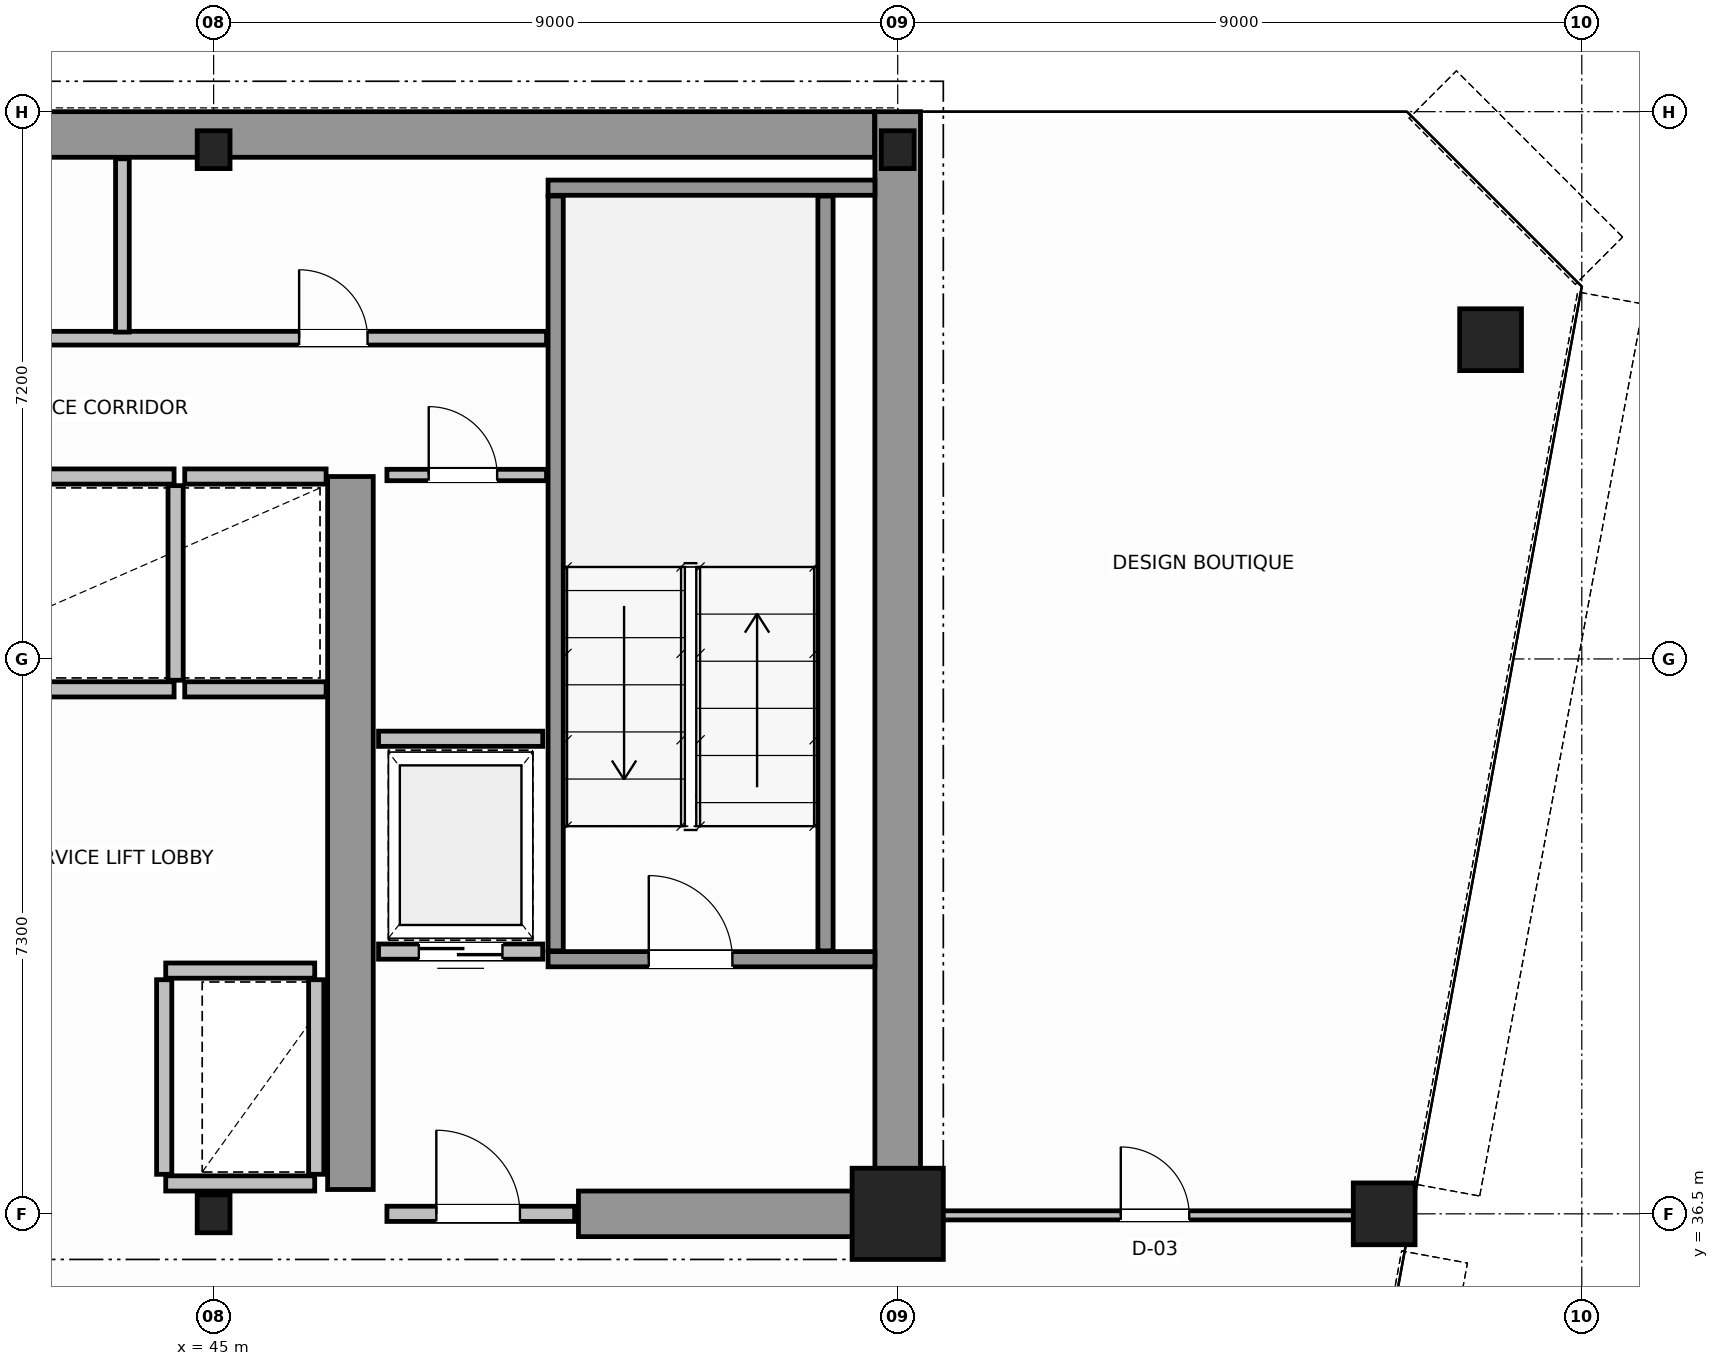
"""IFC4 building model, lengths in metres.
Left out: names, types, materials, properties, quantities, classifications, styles, units other than length and angle.
Written with IfcOpenShell. Run it as: python <this file> out.ifc"""

import sys

from ifc_helpers import new_model, si_unit, direction, frame, frame_2d, origin, origin_2d, place, context, subcontext, project, spatial, rectangle, hollow_circle, i_section, extrude, source, transform, mapped, element, fill, save


model = new_model("IFC4")
c1 = context("Model", 3, precision=1e-05, world=origin(), true_north=direction((0.0, 1.0)))
c2 = subcontext(c1, "Body", "Model", "MODEL_VIEW")
j1 = project(units=[si_unit("LENGTHUNIT", "METRE"), si_unit("PLANEANGLEUNIT", "RADIAN")], contexts=[c1])
p1 = place(None, origin())
s1 = spatial("IfcSite", under=j1, at=p1, CompositionType="ELEMENT")
p2 = place(p1, origin())
s2 = spatial("IfcBuilding", under=s1, at=p2, CompositionType="ELEMENT")
p3 = place(p2, frame((0.0, 0.0, 188.0)))
s3 = spatial("IfcBuildingStorey", under=s2, at=p3, CompositionType="ELEMENT", Elevation=188.0)
m1 = source(origin(), c2, "Body", "SweptSolid", [
    extrude(i_section(OverallWidth=0.432, OverallDepth=0.498, WebThickness=0.055, FlangeThickness=0.068, FilletRadius=0.015, at=origin_2d()), origin(), (0.0, 0.0, 1.0), 3.8),
])
p4 = place(p3, frame((45.0, 36.5, 0.0), z_axis=(0.0, 0.0, 1.0), x_axis=(1.0, 0.0, 0.0)))
e1 = element("IfcColumn", 1, at=p4, inside=s3, PredefinedType="COLUMN", context=c2, shape_type="MappedRepresentation", body=[
    mapped(m1, transform((0.0, 0.0, 0.0), scale=1.0)),
])
m2 = source(origin(), c2, "Body", "SweptSolid", [
    extrude(rectangle(XDim=1.2, YDim=1.2, at=origin_2d()), origin(), (0.0, 0.0, 1.0), 3.8),
])
p5 = place(p3, frame((54.0, 36.5, 0.0), z_axis=(0.0, 0.0, 1.0), x_axis=(1.0, 0.0, 0.0)))
e2 = element("IfcColumn", 2, at=p5, inside=s3, PredefinedType="COLUMN", context=c2, shape_type="MappedRepresentation", body=[
    mapped(m2, transform((0.0, 0.0, 0.0), scale=1.0)),
])
for number, where, z_axis, x_axis in (
    (3, (45.0, 50.5, 0.0), (0.0, 0.0, 1.0), (1.0, 0.0, 0.0)),
    (4, (54.0, 50.5, 0.0), (0.0, 0.0, 1.0), (1.0, 0.0, 0.0)),
):
    element("IfcColumn", number, at=place(p3, frame(where, z_axis=z_axis, x_axis=x_axis)), inside=s3, PredefinedType="COLUMN", context=c2, shape_type="MappedRepresentation", body=[
        mapped(m1, transform((0.0, 0.0, 0.0), scale=1.0)),
    ])
m3 = source(origin(), c2, "Body", "SweptSolid", [
    extrude(hollow_circle(Radius=0.406, WallThickness=0.04, at=origin_2d()), origin(), (0.0, 0.0, 1.0), 3.8),
])
for number, where, z_axis, x_axis in (
    (5, (61.8, 48.0, 0.0), (0.0, 0.0, 1.0), (1.0, 0.0, 0.0)),
    (6, (60.4, 36.5, 0.0), (0.0, 0.0, 1.0), (1.0, 0.0, 0.0)),
):
    element("IfcColumn", number, at=place(p3, frame(where, z_axis=z_axis, x_axis=x_axis)), inside=s3, PredefinedType="COLUMN", context=c2, shape_type="MappedRepresentation", body=[
        mapped(m3, transform((0.0, 0.0, 0.0), scale=1.0)),
    ])
p6 = place(p3, frame((34.002, 50.7, 0.0), z_axis=(0.0, 0.0, 1.0), x_axis=(1.0, 0.0, 0.0)))
e7 = element("IfcWall", 7, at=p6, inside=s3, PredefinedType="SHEAR", context=c2, shape_type="SweptSolid", body=[
    extrude(rectangle(XDim=19.694, YDim=0.6, at=frame_2d((9.847, 0.0))), origin(), (0.0, 0.0, 1.0), 3.8),
])
p7 = place(p3, frame((54.0, 36.5, 0.0), z_axis=(0.0, 0.0, 1.0), x_axis=(0.0, 1.0, 0.0)))
e8 = element("IfcWall", 8, at=p7, inside=s3, PredefinedType="SHEAR", context=c2, shape_type="SweptSolid", body=[
    extrude(rectangle(XDim=14.5, YDim=0.6, at=frame_2d((7.25, 0.0))), origin(), (0.0, 0.0, 1.0), 3.8),
])
p8 = place(p3, frame((49.8, 36.5, 0.0), z_axis=(0.0, 0.0, 1.0), x_axis=(1.0, 0.0, 0.0)))
e9 = element("IfcWall", 9, at=p8, inside=s3, PredefinedType="SHEAR", context=c2, shape_type="SweptSolid", body=[
    extrude(rectangle(XDim=3.88, YDim=0.6, at=frame_2d((1.94, 0.0))), origin(), (0.0, 0.0, 1.0), 2.58),
])
p9 = place(p3, frame((46.8, 36.82, 0.0), z_axis=(0.0, 0.0, 1.0), x_axis=(0.0, 1.0, 0.0)))
e10 = element("IfcWall", 10, at=p9, inside=s3, PredefinedType="SHEAR", context=c2, shape_type="SweptSolid", body=[
    extrude(rectangle(XDim=9.38, YDim=0.6, at=frame_2d((4.69, 0.0))), origin(), (0.0, 0.0, 1.0), 3.8),
])
p10 = place(p3, frame((49.4, 39.85, 0.0), z_axis=(0.0, 0.0, 1.0), x_axis=(1.0, 0.0, 0.0)))
e11 = element("IfcWall", 11, at=p10, inside=s3, PredefinedType="SOLIDWALL", context=c2, shape_type="SweptSolid", body=[
    extrude(rectangle(XDim=4.3, YDim=0.2, at=frame_2d((2.15, 0.0))), origin(), (0.0, 0.0, 1.0), 3.8),
])
p11 = place(p10, frame((1.325, 0.0, 0.0)))
e12 = element("IfcOpeningElement", 12, at=p11, cuts=e11, PredefinedType="OPENING", context=c2, shape_type="SweptSolid", body=[
    extrude(rectangle(XDim=1.1, YDim=2.15, at=frame_2d((0.55, 1.075))), frame((0.0, 0.11, 0.0), z_axis=(0.0, -1.0, 0.0), x_axis=(1.0, 0.0, 0.0)), (0.0, 0.0, 1.0), 0.22),
])
p12 = place(p3, frame((49.4, 50.0, 0.0), z_axis=(0.0, 0.0, 1.0), x_axis=(1.0, 0.0, 0.0)))
e13 = element("IfcWall", 13, at=p12, inside=s3, PredefinedType="SOLIDWALL", context=c2, shape_type="SweptSolid", body=[
    extrude(rectangle(XDim=4.3, YDim=0.2, at=frame_2d((2.15, 0.0))), origin(), (0.0, 0.0, 1.0), 3.8),
])
for number, where, z_axis, x_axis in (
    (14, (49.5, 39.96, 0.0), (0.0, 0.0, 1.0), (0.0, 1.0, 0.0)),
    (15, (53.05, 39.96, 0.0), (0.0, 0.0, 1.0), (0.0, 1.0, 0.0)),
):
    element("IfcWall", number, at=place(p3, frame(where, z_axis=z_axis, x_axis=x_axis)), inside=s3, PredefinedType="SOLIDWALL", context=c2, shape_type="SweptSolid", body=[
        extrude(rectangle(XDim=9.93, YDim=0.2, at=frame_2d((4.965, 0.0))), origin(), (0.0, 0.0, 1.0), 3.8),
    ])
p13 = place(p3, frame((47.28, 36.5, 0.0), z_axis=(0.0, 0.0, 1.0), x_axis=(1.0, 0.0, 0.0)))
e16 = element("IfcWall", 16, at=p13, inside=s3, PredefinedType="SOLIDWALL", context=c2, shape_type="SweptSolid", body=[
    extrude(rectangle(XDim=2.47, YDim=0.2, at=frame_2d((1.235, 0.0))), origin(), (0.0, 0.0, 1.0), 2.57),
])
p14 = place(p13, frame((0.65, 0.0, 0.0)))
e17 = element("IfcOpeningElement", 17, at=p14, cuts=e16, PredefinedType="OPENING", context=c2, shape_type="SweptSolid", body=[
    extrude(rectangle(XDim=1.1, YDim=2.15, at=frame_2d((0.55, 1.075))), frame((0.0, 0.11, 0.0), z_axis=(0.0, -1.0, 0.0), x_axis=(1.0, 0.0, 0.0)), (0.0, 0.0, 1.0), 0.22),
])
p15 = place(p3, frame((44.37, 39.7, 0.0), z_axis=(0.0, 0.0, 1.0), x_axis=(1.0, 0.0, 0.0)))
e18 = element("IfcWall", 18, at=p15, inside=s3, PredefinedType="SOLIDWALL", context=c2, shape_type="SweptSolid", body=[
    extrude(rectangle(XDim=1.96, YDim=0.2, at=frame_2d((0.98, 0.0))), origin(), (0.0, 0.0, 1.0), 3.58),
])
p16 = place(p3, frame((44.37, 36.9, 0.0), z_axis=(0.0, 0.0, 1.0), x_axis=(1.0, 0.0, 0.0)))
e19 = element("IfcWall", 19, at=p16, inside=s3, PredefinedType="SOLIDWALL", context=c2, shape_type="SweptSolid", body=[
    extrude(rectangle(XDim=1.96, YDim=0.2, at=frame_2d((0.98, 0.0))), origin(), (0.0, 0.0, 1.0), 2.57),
])
for number, where, z_axis, x_axis in (
    (20, (44.35, 37.02, 0.0), (0.0, 0.0, 1.0), (0.0, 1.0, 0.0)),
    (21, (46.35, 37.02, 0.0), (0.0, 0.0, 1.0), (0.0, 1.0, 0.0)),
):
    element("IfcWall", number, at=place(p3, frame(where, z_axis=z_axis, x_axis=x_axis)), inside=s3, PredefinedType="SOLIDWALL", context=c2, shape_type="SweptSolid", body=[
        extrude(rectangle(XDim=2.56, YDim=0.2, at=frame_2d((1.28, 0.0))), origin(), (0.0, 0.0, 1.0), 3.58),
    ])
for number, where, z_axis, x_axis in (
    (22, (42.62, 43.4, 0.0), (0.0, 0.0, 1.0), (1.0, 0.0, 0.0)),
    (23, (42.62, 46.2, 0.0), (0.0, 0.0, 1.0), (1.0, 0.0, 0.0)),
):
    element("IfcWall", number, at=place(p3, frame(where, z_axis=z_axis, x_axis=x_axis)), inside=s3, PredefinedType="SOLIDWALL", context=c2, shape_type="SweptSolid", body=[
        extrude(rectangle(XDim=1.86, YDim=0.2, at=frame_2d((0.93, 0.0))), origin(), (0.0, 0.0, 1.0), 3.58),
    ])
p17 = place(p3, frame((44.5, 43.52, 0.0), z_axis=(0.0, 0.0, 1.0), x_axis=(0.0, 1.0, 0.0)))
e24 = element("IfcWall", 24, at=p17, inside=s3, PredefinedType="SOLIDWALL", context=c2, shape_type="SweptSolid", body=[
    extrude(rectangle(XDim=2.56, YDim=0.2, at=frame_2d((1.28, 0.0))), origin(), (0.0, 0.0, 1.0), 3.58),
])
for number, where, z_axis, x_axis in (
    (25, (44.62, 43.4, 0.0), (0.0, 0.0, 1.0), (1.0, 0.0, 0.0)),
    (26, (44.62, 46.2, 0.0), (0.0, 0.0, 1.0), (1.0, 0.0, 0.0)),
):
    element("IfcWall", number, at=place(p3, frame(where, z_axis=z_axis, x_axis=x_axis)), inside=s3, PredefinedType="SOLIDWALL", context=c2, shape_type="SweptSolid", body=[
        extrude(rectangle(XDim=1.86, YDim=0.2, at=frame_2d((0.93, 0.0))), origin(), (0.0, 0.0, 1.0), 3.58),
    ])
p18 = place(p3, frame((47.17, 39.95, 0.0), z_axis=(0.0, 0.0, 1.0), x_axis=(1.0, 0.0, 0.0)))
e27 = element("IfcWall", 27, at=p18, inside=s3, PredefinedType="SOLIDWALL", context=c2, shape_type="SweptSolid", body=[
    extrude(rectangle(XDim=2.16, YDim=0.2, at=frame_2d((1.08, 0.0))), origin(), (0.0, 0.0, 1.0), 3.58),
])
p19 = place(p18, frame((0.53, 0.0, 0.0)))
e28 = element("IfcOpeningElement", 28, at=p19, cuts=e27, PredefinedType="OPENING", context=c2, shape_type="SweptSolid", body=[
    extrude(rectangle(XDim=1.1, YDim=2.15, at=frame_2d((0.55, 1.075))), frame((0.0, 0.11, 0.0), z_axis=(0.0, -1.0, 0.0), x_axis=(1.0, 0.0, 0.0)), (0.0, 0.0, 1.0), 0.22),
])
p20 = place(p3, frame((47.17, 42.75, 0.0), z_axis=(0.0, 0.0, 1.0), x_axis=(1.0, 0.0, 0.0)))
e29 = element("IfcWall", 29, at=p20, inside=s3, PredefinedType="SOLIDWALL", context=c2, shape_type="SweptSolid", body=[
    extrude(rectangle(XDim=2.16, YDim=0.2, at=frame_2d((1.08, 0.0))), origin(), (0.0, 0.0, 1.0), 3.58),
])
p21 = place(p3, frame((47.28, 46.22, 0.0), z_axis=(0.0, 0.0, 1.0), x_axis=(1.0, 0.0, 0.0)))
e30 = element("IfcWall", 30, at=p21, inside=s3, PredefinedType="PARTITIONING", context=c2, shape_type="SweptSolid", body=[
    extrude(rectangle(XDim=2.1, YDim=0.15, at=frame_2d((1.05, 0.0))), origin(), (0.0, 0.0, 1.0), 3.58),
])
p22 = place(p21, frame((0.55, 0.0, 0.0)))
e31 = element("IfcOpeningElement", 31, at=p22, cuts=e30, PredefinedType="OPENING", context=c2, shape_type="SweptSolid", body=[
    extrude(rectangle(XDim=0.9, YDim=2.1, at=frame_2d((0.45, 1.05))), frame((0.0, 0.085, 0.0), z_axis=(0.0, -1.0, 0.0), x_axis=(1.0, 0.0, 0.0)), (0.0, 0.0, 1.0), 0.17),
])
p23 = place(p3, frame((18.62, 48.02, 0.0), z_axis=(0.0, 0.0, 1.0), x_axis=(1.0, 0.0, 0.0)))
e32 = element("IfcWall", 32, at=p23, inside=s3, PredefinedType="PLUMBINGWALL", context=c2, shape_type="SweptSolid", body=[
    extrude(rectangle(XDim=30.76, YDim=0.18, at=frame_2d((15.38, 0.0))), origin(), (0.0, 0.0, 1.0), 3.58),
])
p24 = place(p23, frame((1.655, 0.0, 0.0)))
e33 = element("IfcOpeningElement", 33, at=p24, cuts=e32, PredefinedType="OPENING", context=c2, shape_type="SweptSolid", body=[
    extrude(rectangle(XDim=0.9, YDim=2.15, at=frame_2d((0.45, 1.075))), frame((0.0, 0.1, 0.0), z_axis=(0.0, -1.0, 0.0), x_axis=(1.0, 0.0, 0.0)), (0.0, 0.0, 1.0), 0.2),
])
p25 = place(p23, frame((6.03, 0.0, 0.0)))
e34 = element("IfcOpeningElement", 34, at=p25, cuts=e32, PredefinedType="OPENING", context=c2, shape_type="SweptSolid", body=[
    extrude(rectangle(XDim=0.9, YDim=2.15, at=frame_2d((0.45, 1.075))), frame((0.0, 0.1, 0.0), z_axis=(0.0, -1.0, 0.0), x_axis=(1.0, 0.0, 0.0)), (0.0, 0.0, 1.0), 0.2),
])
p26 = place(p23, frame((10.93, 0.0, 0.0)))
e35 = element("IfcOpeningElement", 35, at=p26, cuts=e32, PredefinedType="OPENING", context=c2, shape_type="SweptSolid", body=[
    extrude(rectangle(XDim=0.9, YDim=2.15, at=frame_2d((0.45, 1.075))), frame((0.0, 0.1, 0.0), z_axis=(0.0, -1.0, 0.0), x_axis=(1.0, 0.0, 0.0)), (0.0, 0.0, 1.0), 0.2),
])
p27 = place(p23, frame((16.13, 0.0, 0.0)))
e36 = element("IfcOpeningElement", 36, at=p27, cuts=e32, PredefinedType="OPENING", context=c2, shape_type="SweptSolid", body=[
    extrude(rectangle(XDim=0.9, YDim=2.15, at=frame_2d((0.45, 1.075))), frame((0.0, 0.1, 0.0), z_axis=(0.0, -1.0, 0.0), x_axis=(1.0, 0.0, 0.0)), (0.0, 0.0, 1.0), 0.2),
])
p28 = place(p23, frame((21.73, 0.0, 0.0)))
e37 = element("IfcOpeningElement", 37, at=p28, cuts=e32, PredefinedType="OPENING", context=c2, shape_type="SweptSolid", body=[
    extrude(rectangle(XDim=0.9, YDim=2.15, at=frame_2d((0.45, 1.075))), frame((0.0, 0.1, 0.0), z_axis=(0.0, -1.0, 0.0), x_axis=(1.0, 0.0, 0.0)), (0.0, 0.0, 1.0), 0.2),
])
p29 = place(p23, frame((27.505, 0.0, 0.0)))
e38 = element("IfcOpeningElement", 38, at=p29, cuts=e32, PredefinedType="OPENING", context=c2, shape_type="SweptSolid", body=[
    extrude(rectangle(XDim=0.9, YDim=2.15, at=frame_2d((0.45, 1.075))), frame((0.0, 0.1, 0.0), z_axis=(0.0, -1.0, 0.0), x_axis=(1.0, 0.0, 0.0)), (0.0, 0.0, 1.0), 0.2),
])
p30 = place(p3, frame((43.8, 48.1, 0.0), z_axis=(0.0, 0.0, 1.0), x_axis=(0.0, 1.0, 0.0)))
e39 = element("IfcWall", 39, at=p30, inside=s3, PredefinedType="PLUMBINGWALL", context=c2, shape_type="SweptSolid", body=[
    extrude(rectangle(XDim=2.28, YDim=0.18, at=frame_2d((1.14, 0.0))), origin(), (0.0, 0.0, 1.0), 3.58),
])
p31 = place(p3, frame((54.06, 36.48, 0.0), z_axis=(0.0, 0.0, 1.0), x_axis=(1.0, 0.0, 0.0)))
e40 = element("IfcWall", 40, at=p31, inside=s3, PredefinedType="PARTITIONING", context=c2, shape_type="SweptSolid", body=[
    extrude(rectangle(XDim=6.651, YDim=0.12, at=frame_2d((3.325, 0.0))), origin(), (0.0, 0.0, 1.0), 2.97),
])
p32 = place(p31, frame((2.875, 0.0, 0.0)))
e41 = element("IfcOpeningElement", 41, at=p32, cuts=e40, PredefinedType="OPENING", context=c2, shape_type="SweptSolid", body=[
    extrude(rectangle(XDim=0.9, YDim=2.15, at=frame_2d((0.45, 1.075))), frame((0.0, 0.07, 0.0), z_axis=(0.0, -1.0, 0.0), x_axis=(1.0, 0.0, 0.0)), (0.0, 0.0, 1.0), 0.14),
])
m4 = source(origin(), c2, "Body", "SweptSolid", [
    extrude(rectangle(XDim=1.1, YDim=2.15, at=frame_2d((0.55, 1.075))), frame((0.0, 0.025, 0.0), z_axis=(0.0, -1.0, 0.0), x_axis=(1.0, 0.0, 0.0)), (0.0, 0.0, 1.0), 0.05),
])
p33 = place(p11, origin())
e42 = element("IfcDoor", 42, at=p33, inside=s3, OperationType="SINGLE_SWING_RIGHT", PredefinedType="DOOR", context=c2, shape_type="MappedRepresentation", body=[
    mapped(m4, transform((0.0, 0.0, 0.0), scale=1.0)),
])
fill(e12, e42)
p34 = place(p14, origin())
e43 = element("IfcDoor", 43, at=p34, inside=s3, OperationType="SINGLE_SWING_LEFT", PredefinedType="DOOR", context=c2, shape_type="MappedRepresentation", body=[
    mapped(m4, transform((0.0, 0.0, 0.0), scale=1.0)),
])
fill(e17, e43)
p35 = place(p19, origin())
e44 = element("IfcDoor", 44, at=p35, inside=s3, OperationType="DOUBLE_DOOR_SLIDING", PredefinedType="DOOR", context=c2, shape_type="MappedRepresentation", body=[
    mapped(m4, transform((0.0, 0.0, 0.0), scale=1.0)),
])
fill(e28, e44)
m5 = source(origin(), c2, "Body", "SweptSolid", [
    extrude(rectangle(XDim=0.9, YDim=2.1, at=frame_2d((0.45, 1.05))), frame((0.0, 0.025, 0.0), z_axis=(0.0, -1.0, 0.0), x_axis=(1.0, 0.0, 0.0)), (0.0, 0.0, 1.0), 0.05),
])
p36 = place(p22, origin())
e45 = element("IfcDoor", 45, at=p36, inside=s3, OperationType="SINGLE_SWING_RIGHT", PredefinedType="DOOR", context=c2, shape_type="MappedRepresentation", body=[
    mapped(m5, transform((0.0, 0.0, 0.0), scale=1.0)),
])
fill(e31, e45)
m6 = source(origin(), c2, "Body", "SweptSolid", [
    extrude(rectangle(XDim=0.9, YDim=2.15, at=frame_2d((0.45, 1.075))), frame((0.0, 0.025, 0.0), z_axis=(0.0, -1.0, 0.0), x_axis=(1.0, 0.0, 0.0)), (0.0, 0.0, 1.0), 0.05),
])
p37 = place(p29, origin())
e46 = element("IfcDoor", 46, at=p37, inside=s3, OperationType="SINGLE_SWING_RIGHT", PredefinedType="DOOR", context=c2, shape_type="MappedRepresentation", body=[
    mapped(m6, transform((0.0, 0.0, 0.0), scale=1.0)),
])
fill(e38, e46)
p38 = place(p32, origin())
e47 = element("IfcDoor", 47, at=p38, inside=s3, OperationType="SINGLE_SWING_RIGHT", PredefinedType="DOOR", context=c2, shape_type="MappedRepresentation", body=[
    mapped(m6, transform((0.0, 0.0, 0.0), scale=1.0)),
])
fill(e41, e47)
save(model, sys.argv[1])
